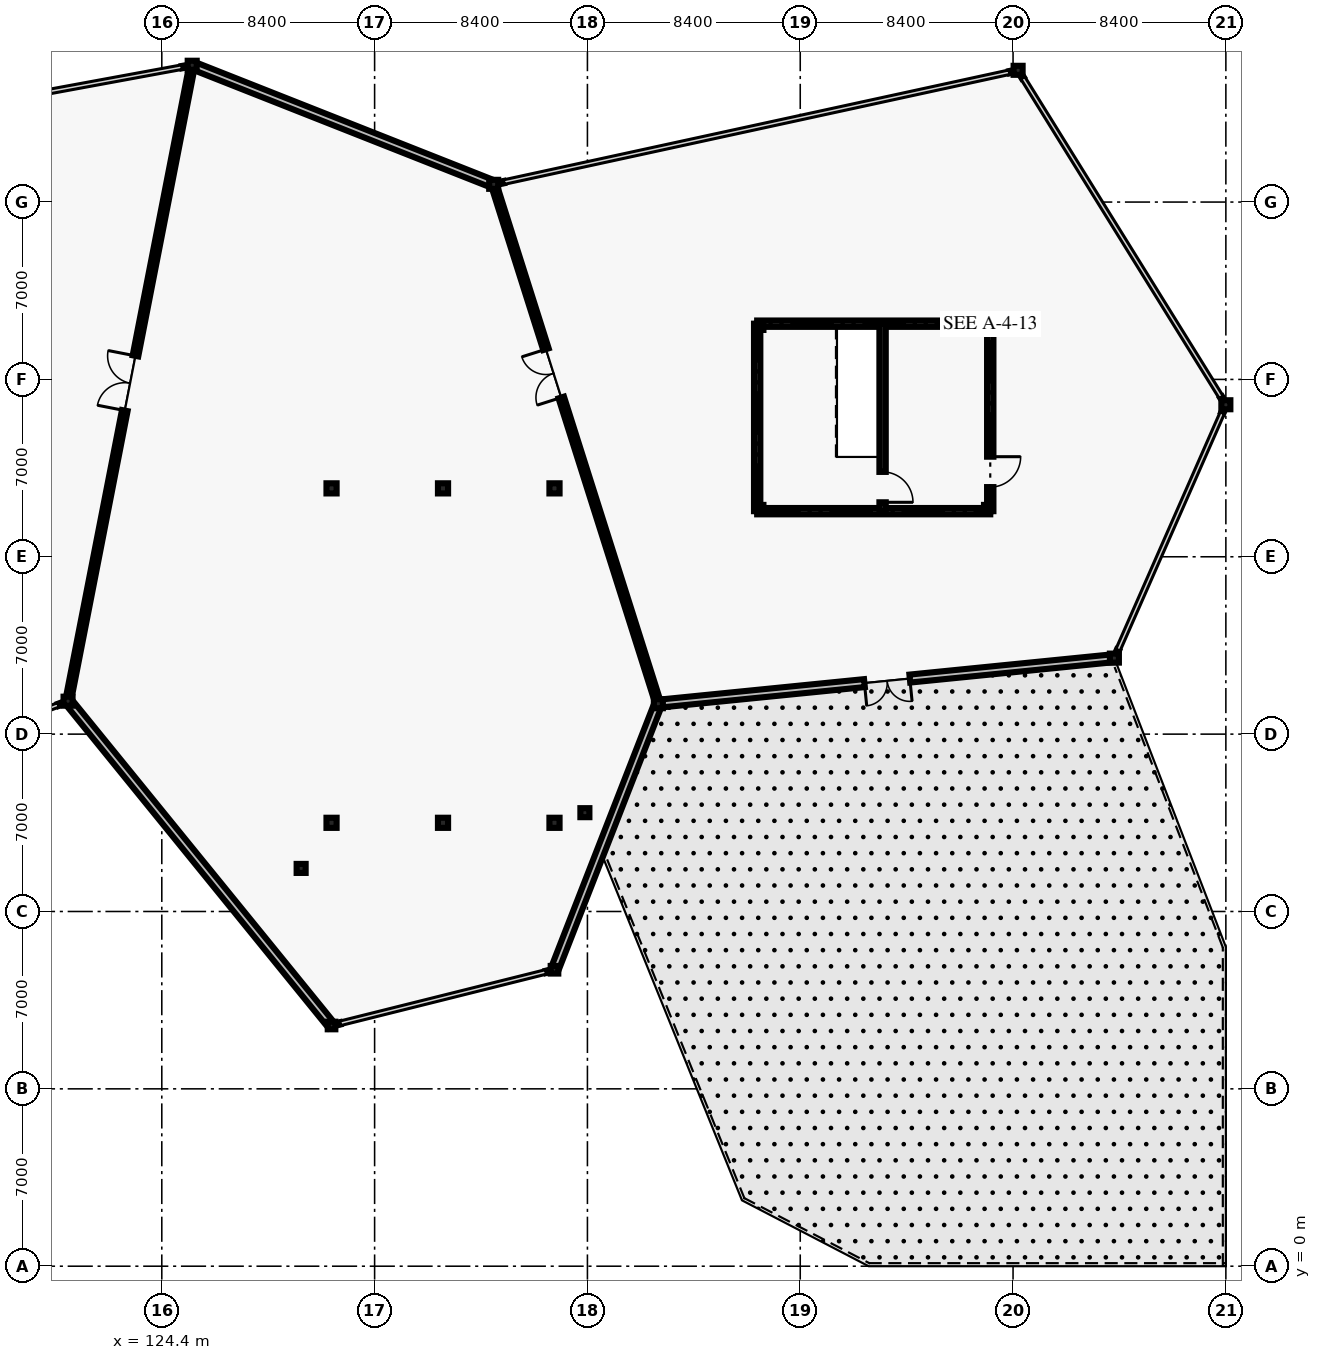
"""IFC4 building model, lengths in metres.
Left out: names, types, materials, properties, quantities, classifications, styles, units other than length and angle.
Written with IfcOpenShell. Run it as: python <this file> out.ifc"""

import sys

from ifc_helpers import new_model, si_unit, direction, frame, frame_2d, origin, origin_2d, place, context, subcontext, project, spatial, rectangle, hollow_rectangle, hollow_circle, i_section, extrude, element, fill, save


model = new_model("IFC4")
c1 = context("Model", 3, precision=1e-05, world=origin(), true_north=direction((0.0, 1.0)))
c2 = subcontext(c1, "Body", "Model", "MODEL_VIEW")
j1 = project(units=[si_unit("LENGTHUNIT", "METRE"), si_unit("PLANEANGLEUNIT", "RADIAN")], contexts=[c1])
p1 = place(None, origin())
s1 = spatial("IfcSite", under=j1, at=p1, CompositionType="ELEMENT")
p2 = place(p1, origin())
s2 = spatial("IfcBuilding", under=s1, at=p2, CompositionType="ELEMENT")
p3 = place(p2, frame((0.0, 0.0, 10.2)))
s3 = spatial("IfcBuildingStorey", under=s2, at=p3, CompositionType="ELEMENT", Elevation=10.2)
for number, where, z_axis, x_axis in (
    (1, (120.7, 22.3, 0.0), (0.0, 0.0, 1.0), (1.0, 0.0, 0.0)),
    (2, (125.6, 47.4, 0.0), (0.0, 0.0, 1.0), (1.0, 0.0, 0.0)),
    (3, (129.9, 15.7, 0.0), (0.0, 0.0, 1.0), (1.0, 0.0, 0.0)),
):
    element("IfcColumn", number, at=place(p3, frame(where, z_axis=z_axis, x_axis=x_axis)), inside=s3, PredefinedType="COLUMN", context=c2, shape_type="SweptSolid", body=[
        extrude(hollow_circle(Radius=0.178, WallThickness=0.013, at=origin_2d()), origin(), (0.0, 0.0, 1.0), 4.8),
    ])
p4 = place(p3, frame((131.1, 9.5, 0.0), z_axis=(0.0, 0.0, 1.0), x_axis=(1.0, 0.0, 0.0)))
e4 = element("IfcColumn", 4, at=p4, inside=s3, PredefinedType="COLUMN", context=c2, shape_type="SweptSolid", body=[
    extrude(hollow_rectangle(XDim=0.3, YDim=0.3, WallThickness=0.012, InnerFilletRadius=0.019, OuterFilletRadius=0.031, at=origin_2d()), origin(), (0.0, 0.0, 1.0), 4.8),
])
p5 = place(p3, frame((137.5, 42.7, 0.0), z_axis=(0.0, 0.0, 1.0), x_axis=(1.0, 0.0, 0.0)))
e5 = element("IfcColumn", 5, at=p5, inside=s3, PredefinedType="COLUMN", context=c2, shape_type="SweptSolid", body=[
    extrude(hollow_circle(Radius=0.178, WallThickness=0.013, at=origin_2d()), origin(), (0.0, 0.0, 1.0), 4.8),
])
p6 = place(p3, frame((139.9, 11.7, 0.0), z_axis=(0.0, 0.0, 1.0), x_axis=(1.0, 0.0, 0.0)))
e6 = element("IfcColumn", 6, at=p6, inside=s3, PredefinedType="COLUMN", context=c2, shape_type="SweptSolid", body=[
    extrude(hollow_rectangle(XDim=0.3, YDim=0.3, WallThickness=0.012, InnerFilletRadius=0.019, OuterFilletRadius=0.031, at=origin_2d()), origin(), (0.0, 0.0, 1.0), 4.8),
])
for number, where, z_axis, x_axis in (
    (7, (141.1, 17.9, 0.0), (0.0, 0.0, 1.0), (1.0, 0.0, 0.0)),
    (8, (144.0, 22.2, 0.0), (0.0, 0.0, 1.0), (1.0, 0.0, 0.0)),
    (9, (158.2, 47.2, 0.0), (0.0, 0.0, 1.0), (1.0, 0.0, 0.0)),
    (10, (162.0, 24.0, 0.0), (0.0, 0.0, 1.0), (1.0, 0.0, 0.0)),
    (11, (166.4, 34.0, 0.0), (0.0, 0.0, 1.0), (1.0, 0.0, 0.0)),
):
    element("IfcColumn", number, at=place(p3, frame(where, z_axis=z_axis, x_axis=x_axis)), inside=s3, PredefinedType="COLUMN", context=c2, shape_type="SweptSolid", body=[
        extrude(hollow_circle(Radius=0.178, WallThickness=0.013, at=origin_2d()), origin(), (0.0, 0.0, 1.0), 4.8),
    ])
for number, where, z_axis, x_axis in (
    (12, (131.1, 17.5, 0.0), (0.0, 0.0, 1.0), (1.0, 0.0, 0.0)),
    (13, (131.1, 30.7, 0.0), (0.0, 0.0, 1.0), (1.0, 0.0, 0.0)),
    (14, (135.5, 17.5, 0.0), (0.0, 0.0, 1.0), (1.0, 0.0, 0.0)),
    (15, (135.5, 30.7, 0.0), (0.0, 0.0, 1.0), (1.0, 0.0, 0.0)),
    (16, (139.9, 17.5, 0.0), (0.0, 0.0, 1.0), (1.0, 0.0, 0.0)),
    (17, (139.9, 30.7, 0.0), (0.0, 0.0, 1.0), (1.0, 0.0, 0.0)),
):
    element("IfcColumn", number, at=place(p3, frame(where, z_axis=z_axis, x_axis=x_axis)), inside=s3, PredefinedType="COLUMN", context=c2, shape_type="SweptSolid", body=[
        extrude(i_section(OverallWidth=0.4, OverallDepth=0.4, WebThickness=0.022, FlangeThickness=0.036, at=origin_2d()), origin(), (0.0, 0.0, 1.0), 4.8),
    ])
for number, where, z_axis, x_axis in (
    (18, (148.02, 29.92, 0.0), (0.0, 0.0, 1.0), (1.0, 0.0, 0.0)),
    (19, (156.98, 29.92, 0.0), (0.0, 0.0, 1.0), (1.0, 0.0, 0.0)),
    (20, (156.98, 37.08, 0.0), (0.0, 0.0, 1.0), (1.0, 0.0, 0.0)),
    (21, (148.02, 37.08, 0.0), (0.0, 0.0, 1.0), (1.0, 0.0, 0.0)),
):
    element("IfcColumn", number, at=place(p3, frame(where, z_axis=z_axis, x_axis=x_axis)), inside=s3, PredefinedType="COLUMN", context=c2, shape_type="SweptSolid", body=[
        extrude(i_section(OverallWidth=0.254, OverallDepth=0.254, WebThickness=0.009, FlangeThickness=0.014, FilletRadius=0.013, at=origin_2d()), origin(), (0.0, 0.0, 1.0), 4.8),
    ])
for number, where, z_axis, x_axis in (
    (22, (120.605, 22.264, 0.0), (0.0, 0.0, 1.0), (-0.935, -0.354, 0.0)),
    (23, (125.193, 47.325, 0.0), (0.0, 0.0, 1.0), (0.984, 0.178, 0.0)),
):
    element("IfcWall", number, at=place(p3, frame(where, z_axis=z_axis, x_axis=x_axis)), inside=s3, PredefinedType="SOLIDWALL", context=c2, shape_type="SweptSolid", body=[
        extrude(rectangle(XDim=0.308, YDim=0.095, at=frame_2d((0.154, 0.0))), origin(), (0.0, 0.0, 1.0), 3.62),
    ])
p7 = place(p3, frame((143.978, 22.144, 0.0), z_axis=(0.0, 0.0, 1.0), x_axis=(-0.363726839551, -0.93150565548, 0.0)))
e24 = element("IfcWall", 24, at=p7, inside=s3, PredefinedType="SOLIDWALL", context=c2, shape_type="SweptSolid", body=[
    extrude(rectangle(XDim=11.212, YDim=0.315, at=frame_2d((5.606, 0.0))), origin(), (0.0, 0.0, 1.0), 3.62),
])
p8 = place(p3, frame((125.657, 47.378, 0.0), z_axis=(0.0, 0.0, 1.0), x_axis=(0.930068974863, -0.367384950696, 0.0)))
e25 = element("IfcWall", 25, at=p8, inside=s3, PredefinedType="SOLIDWALL", context=c2, shape_type="SweptSolid", body=[
    extrude(rectangle(XDim=12.673, YDim=0.315, at=frame_2d((6.337, 0.0))), origin(), (0.0, 0.0, 1.0), 3.62),
])
p9 = place(p3, frame((131.1, 9.5, 0.0), z_axis=(0.0, 0.0, 1.0), x_axis=(-0.630603811976, 0.776104910641, 0.0)))
e26 = element("IfcWall", 26, at=p9, inside=s3, PredefinedType="SOLIDWALL", context=c2, shape_type="SweptSolid", body=[
    extrude(rectangle(XDim=16.432, YDim=0.315, at=frame_2d((8.216, 0.0))), origin(), (0.0, 0.0, 1.0), 3.62),
])
for number, where, z_axis, x_axis in (
    (27, (139.859, 11.69, 0.0), (0.0, 0.0, 1.0), (-0.97, -0.243, 0.0)),
    (28, (131.44, 9.585, 0.0), (0.0, 0.0, 1.0), (-0.97, -0.243, 0.0)),
):
    element("IfcWall", number, at=place(p3, frame(where, z_axis=z_axis, x_axis=x_axis)), inside=s3, PredefinedType="SOLIDWALL", context=c2, shape_type="SweptSolid", body=[
        extrude(rectangle(XDim=0.308, YDim=0.095, at=frame_2d((0.154, 0.0))), origin(), (0.0, 0.0, 1.0), 3.62),
    ])
p10 = place(p3, frame((162.0, 24.0, 0.0), z_axis=(0.0, 0.0, 1.0), x_axis=(-0.99503745835, -0.099501037587, 0.0)))
e29 = element("IfcWall", 29, at=p10, inside=s3, PredefinedType="SOLIDWALL", context=c2, shape_type="SweptSolid", body=[
    extrude(rectangle(XDim=18.029, YDim=0.315, at=frame_2d((9.015, 0.0))), origin(), (0.0, 0.0, 1.0), 3.62),
])
p11 = place(p10, frame((8.115, 0.0, 0.0)))
e30 = element("IfcOpeningElement", 30, at=p11, cuts=e29, PredefinedType="OPENING", context=c2, shape_type="SweptSolid", body=[
    extrude(rectangle(XDim=1.8, YDim=2.25, at=frame_2d((0.9, 1.125))), frame((0.0, 0.167, 0.0), z_axis=(0.0, -1.0, 0.0), x_axis=(1.0, 0.0, 0.0)), (0.0, 0.0, 1.0), 0.335),
])
for number, where, z_axis, x_axis in (
    (31, (166.383, 33.962, 0.0), (0.0, 0.0, 1.0), (-0.403, -0.915, 0.0)),
    (32, (162.141, 24.32, 0.0), (0.0, 0.0, 1.0), (-0.403, -0.915, 0.0)),
):
    element("IfcWall", number, at=place(p3, frame(where, z_axis=z_axis, x_axis=x_axis)), inside=s3, PredefinedType="SOLIDWALL", context=c2, shape_type="SweptSolid", body=[
        extrude(rectangle(XDim=0.308, YDim=0.095, at=frame_2d((0.154, 0.0))), origin(), (0.0, 0.0, 1.0), 3.62),
    ])
for number, where, z_axis, x_axis in (
    (33, (158.222, 47.164, 0.0), (0.0, 0.0, 1.0), (0.53, -0.848, 0.0)),
    (34, (166.215, 34.297, 0.0), (0.0, 0.0, 1.0), (0.529, -0.849, 0.0)),
    (35, (137.6, 42.722, 0.0), (0.0, 0.0, 1.0), (0.977, 0.212, 0.0)),
    (36, (157.858, 47.126, 0.0), (0.0, 0.0, 1.0), (0.978, 0.211, 0.0)),
):
    element("IfcWall", number, at=place(p3, frame(where, z_axis=z_axis, x_axis=x_axis)), inside=s3, PredefinedType="SOLIDWALL", context=c2, shape_type="SweptSolid", body=[
        extrude(rectangle(XDim=0.308, YDim=0.095, at=frame_2d((0.154, 0.0))), origin(), (0.0, 0.0, 1.0), 3.62),
    ])
p12 = place(p3, frame((120.7, 22.3, 0.0), z_axis=(0.0, 0.0, 1.0), x_axis=(0.191608827438, 0.981471373626, 0.0)))
e37 = element("IfcWall", 37, at=p12, inside=s3, PredefinedType="SOLIDWALL", context=c2, shape_type="SweptSolid", body=[
    extrude(rectangle(XDim=25.574, YDim=0.225, at=frame_2d((12.787, 0.0))), origin(), (0.0, 0.0, 1.0), 4.02),
])
p13 = place(p12, frame((11.687, 0.0, 0.0)))
e38 = element("IfcOpeningElement", 38, at=p13, cuts=e37, PredefinedType="OPENING", context=c2, shape_type="SweptSolid", body=[
    extrude(rectangle(XDim=2.2, YDim=2.6, at=frame_2d((1.1, 1.3))), frame((0.0, 0.123, 0.0), z_axis=(0.0, -1.0, 0.0), x_axis=(1.0, 0.0, 0.0)), (0.0, 0.0, 1.0), 0.245),
])
p14 = place(p3, frame((144.0, 22.2, 0.0), z_axis=(0.0, 0.0, 1.0), x_axis=(-0.302243860734, 0.953230637699, 0.0)))
e39 = element("IfcWall", 39, at=p14, inside=s3, PredefinedType="SOLIDWALL", context=c2, shape_type="SweptSolid", body=[
    extrude(rectangle(XDim=21.506, YDim=0.225, at=frame_2d((10.753, 0.0))), origin(), (0.0, 0.0, 1.0), 4.02),
])
p15 = place(p14, frame((12.679, 0.0, 0.0)))
e40 = element("IfcOpeningElement", 40, at=p15, cuts=e39, PredefinedType="OPENING", context=c2, shape_type="SweptSolid", body=[
    extrude(rectangle(XDim=2.0, YDim=2.5, at=frame_2d((1.0, 1.25))), frame((0.0, 0.123, 0.0), z_axis=(0.0, -1.0, 0.0), x_axis=(1.0, 0.0, 0.0)), (0.0, 0.0, 1.0), 0.245),
])
p16 = place(p3, frame((147.9, 29.8, 0.0), z_axis=(0.0, 0.0, 1.0), x_axis=(0.0, 1.0, 0.0)))
e41 = element("IfcWall", 41, at=p16, inside=s3, PredefinedType="SHEAR", context=c2, shape_type="SweptSolid", body=[
    extrude(rectangle(XDim=7.4, YDim=0.25, at=frame_2d((3.7, 0.0))), origin(), (0.0, 0.0, 1.0), 4.56),
])
for number, where, z_axis, x_axis in (
    (42, (147.9, 37.2, 0.0), (0.0, 0.0, 1.0), (1.0, 0.0, 0.0)),
    (43, (157.1, 29.8, 0.0), (0.0, 0.0, 1.0), (-1.0, 0.0, 0.0)),
):
    element("IfcWall", number, at=place(p3, frame(where, z_axis=z_axis, x_axis=x_axis)), inside=s3, PredefinedType="SHEAR", context=c2, shape_type="SweptSolid", body=[
        extrude(rectangle(XDim=9.2, YDim=0.25, at=frame_2d((4.6, 0.0))), origin(), (0.0, 0.0, 1.0), 4.56),
    ])
p17 = place(p3, frame((157.1, 37.2, 0.0), z_axis=(0.0, 0.0, 1.0), x_axis=(0.0, -1.0, 0.0)))
e44 = element("IfcWall", 44, at=p17, inside=s3, PredefinedType="SHEAR", context=c2, shape_type="SweptSolid", body=[
    extrude(rectangle(XDim=7.4, YDim=0.25, at=frame_2d((3.7, 0.0))), origin(), (0.0, 0.0, 1.0), 4.56),
])
p18 = place(p17, frame((5.25, 0.0, 0.0)))
e45 = element("IfcOpeningElement", 45, at=p18, cuts=e44, PredefinedType="OPENING", context=c2, shape_type="SweptSolid", body=[
    extrude(rectangle(XDim=1.2, YDim=2.2, at=frame_2d((0.6, 1.1))), frame((0.0, 0.135, 0.0), z_axis=(0.0, -1.0, 0.0), x_axis=(1.0, 0.0, 0.0)), (0.0, 0.0, 1.0), 0.27),
])
p19 = place(p3, frame((152.85, 37.2, 0.0), z_axis=(0.0, 0.0, 1.0), x_axis=(0.0, -1.0, 0.0)))
e46 = element("IfcWall", 46, at=p19, inside=s3, PredefinedType="SHEAR", context=c2, shape_type="SweptSolid", body=[
    extrude(rectangle(XDim=7.4, YDim=0.25, at=frame_2d((3.7, 0.0))), origin(), (0.0, 0.0, 1.0), 4.56),
])
p20 = place(p19, frame((5.85, 0.0, 0.0)))
e47 = element("IfcOpeningElement", 47, at=p20, cuts=e46, PredefinedType="OPENING", context=c2, shape_type="SweptSolid", body=[
    extrude(rectangle(XDim=1.2, YDim=2.2, at=frame_2d((0.6, 1.1))), frame((0.0, 0.135, 0.0), z_axis=(0.0, -1.0, 0.0), x_axis=(1.0, 0.0, 0.0)), (0.0, 0.0, 1.0), 0.27),
])
p21 = place(p11, origin())
e48 = element("IfcDoor", 48, at=p21, inside=s3, OperationType="DOUBLE_DOOR_SINGLE_SWING", PredefinedType="DOOR", context=c2, shape_type="SweptSolid", body=[
    extrude(rectangle(XDim=1.8, YDim=2.25, at=frame_2d((0.9, 1.125))), frame((0.0, 0.025, 0.0), z_axis=(0.0, -1.0, 0.0), x_axis=(1.0, 0.0, 0.0)), (0.0, 0.0, 1.0), 0.05),
])
fill(e30, e48)
p22 = place(p13, origin())
e49 = element("IfcDoor", 49, at=p22, inside=s3, OperationType="DOUBLE_DOOR_SINGLE_SWING", PredefinedType="DOOR", context=c2, shape_type="SweptSolid", body=[
    extrude(rectangle(XDim=2.2, YDim=2.6, at=frame_2d((1.1, 1.3))), frame((0.0, 0.025, 0.0), z_axis=(0.0, -1.0, 0.0), x_axis=(1.0, 0.0, 0.0)), (0.0, 0.0, 1.0), 0.05),
])
fill(e38, e49)
p23 = place(p15, origin())
e50 = element("IfcDoor", 50, at=p23, inside=s3, OperationType="DOUBLE_DOOR_SINGLE_SWING", PredefinedType="DOOR", context=c2, shape_type="SweptSolid", body=[
    extrude(rectangle(XDim=2.0, YDim=2.5, at=frame_2d((1.0, 1.25))), frame((0.0, 0.025, 0.0), z_axis=(0.0, -1.0, 0.0), x_axis=(1.0, 0.0, 0.0)), (0.0, 0.0, 1.0), 0.05),
])
fill(e40, e50)
p24 = place(p18, origin())
e51 = element("IfcDoor", 51, at=p24, inside=s3, OperationType="SINGLE_SWING_LEFT", PredefinedType="DOOR", context=c2, shape_type="SweptSolid", body=[
    extrude(rectangle(XDim=1.2, YDim=2.2, at=frame_2d((0.6, 1.1))), frame((0.0, 0.025, 0.0), z_axis=(0.0, -1.0, 0.0), x_axis=(1.0, 0.0, 0.0)), (0.0, 0.0, 1.0), 0.05),
])
fill(e45, e51)
p25 = place(p20, origin())
e52 = element("IfcDoor", 52, at=p25, inside=s3, OperationType="SINGLE_SWING_RIGHT", PredefinedType="DOOR", context=c2, shape_type="SweptSolid", body=[
    extrude(rectangle(XDim=1.2, YDim=2.2, at=frame_2d((0.6, 1.1))), frame((0.0, 0.025, 0.0), z_axis=(0.0, -1.0, 0.0), x_axis=(1.0, 0.0, 0.0)), (0.0, 0.0, 1.0), 0.05),
])
fill(e47, e52)
save(model, sys.argv[1])
